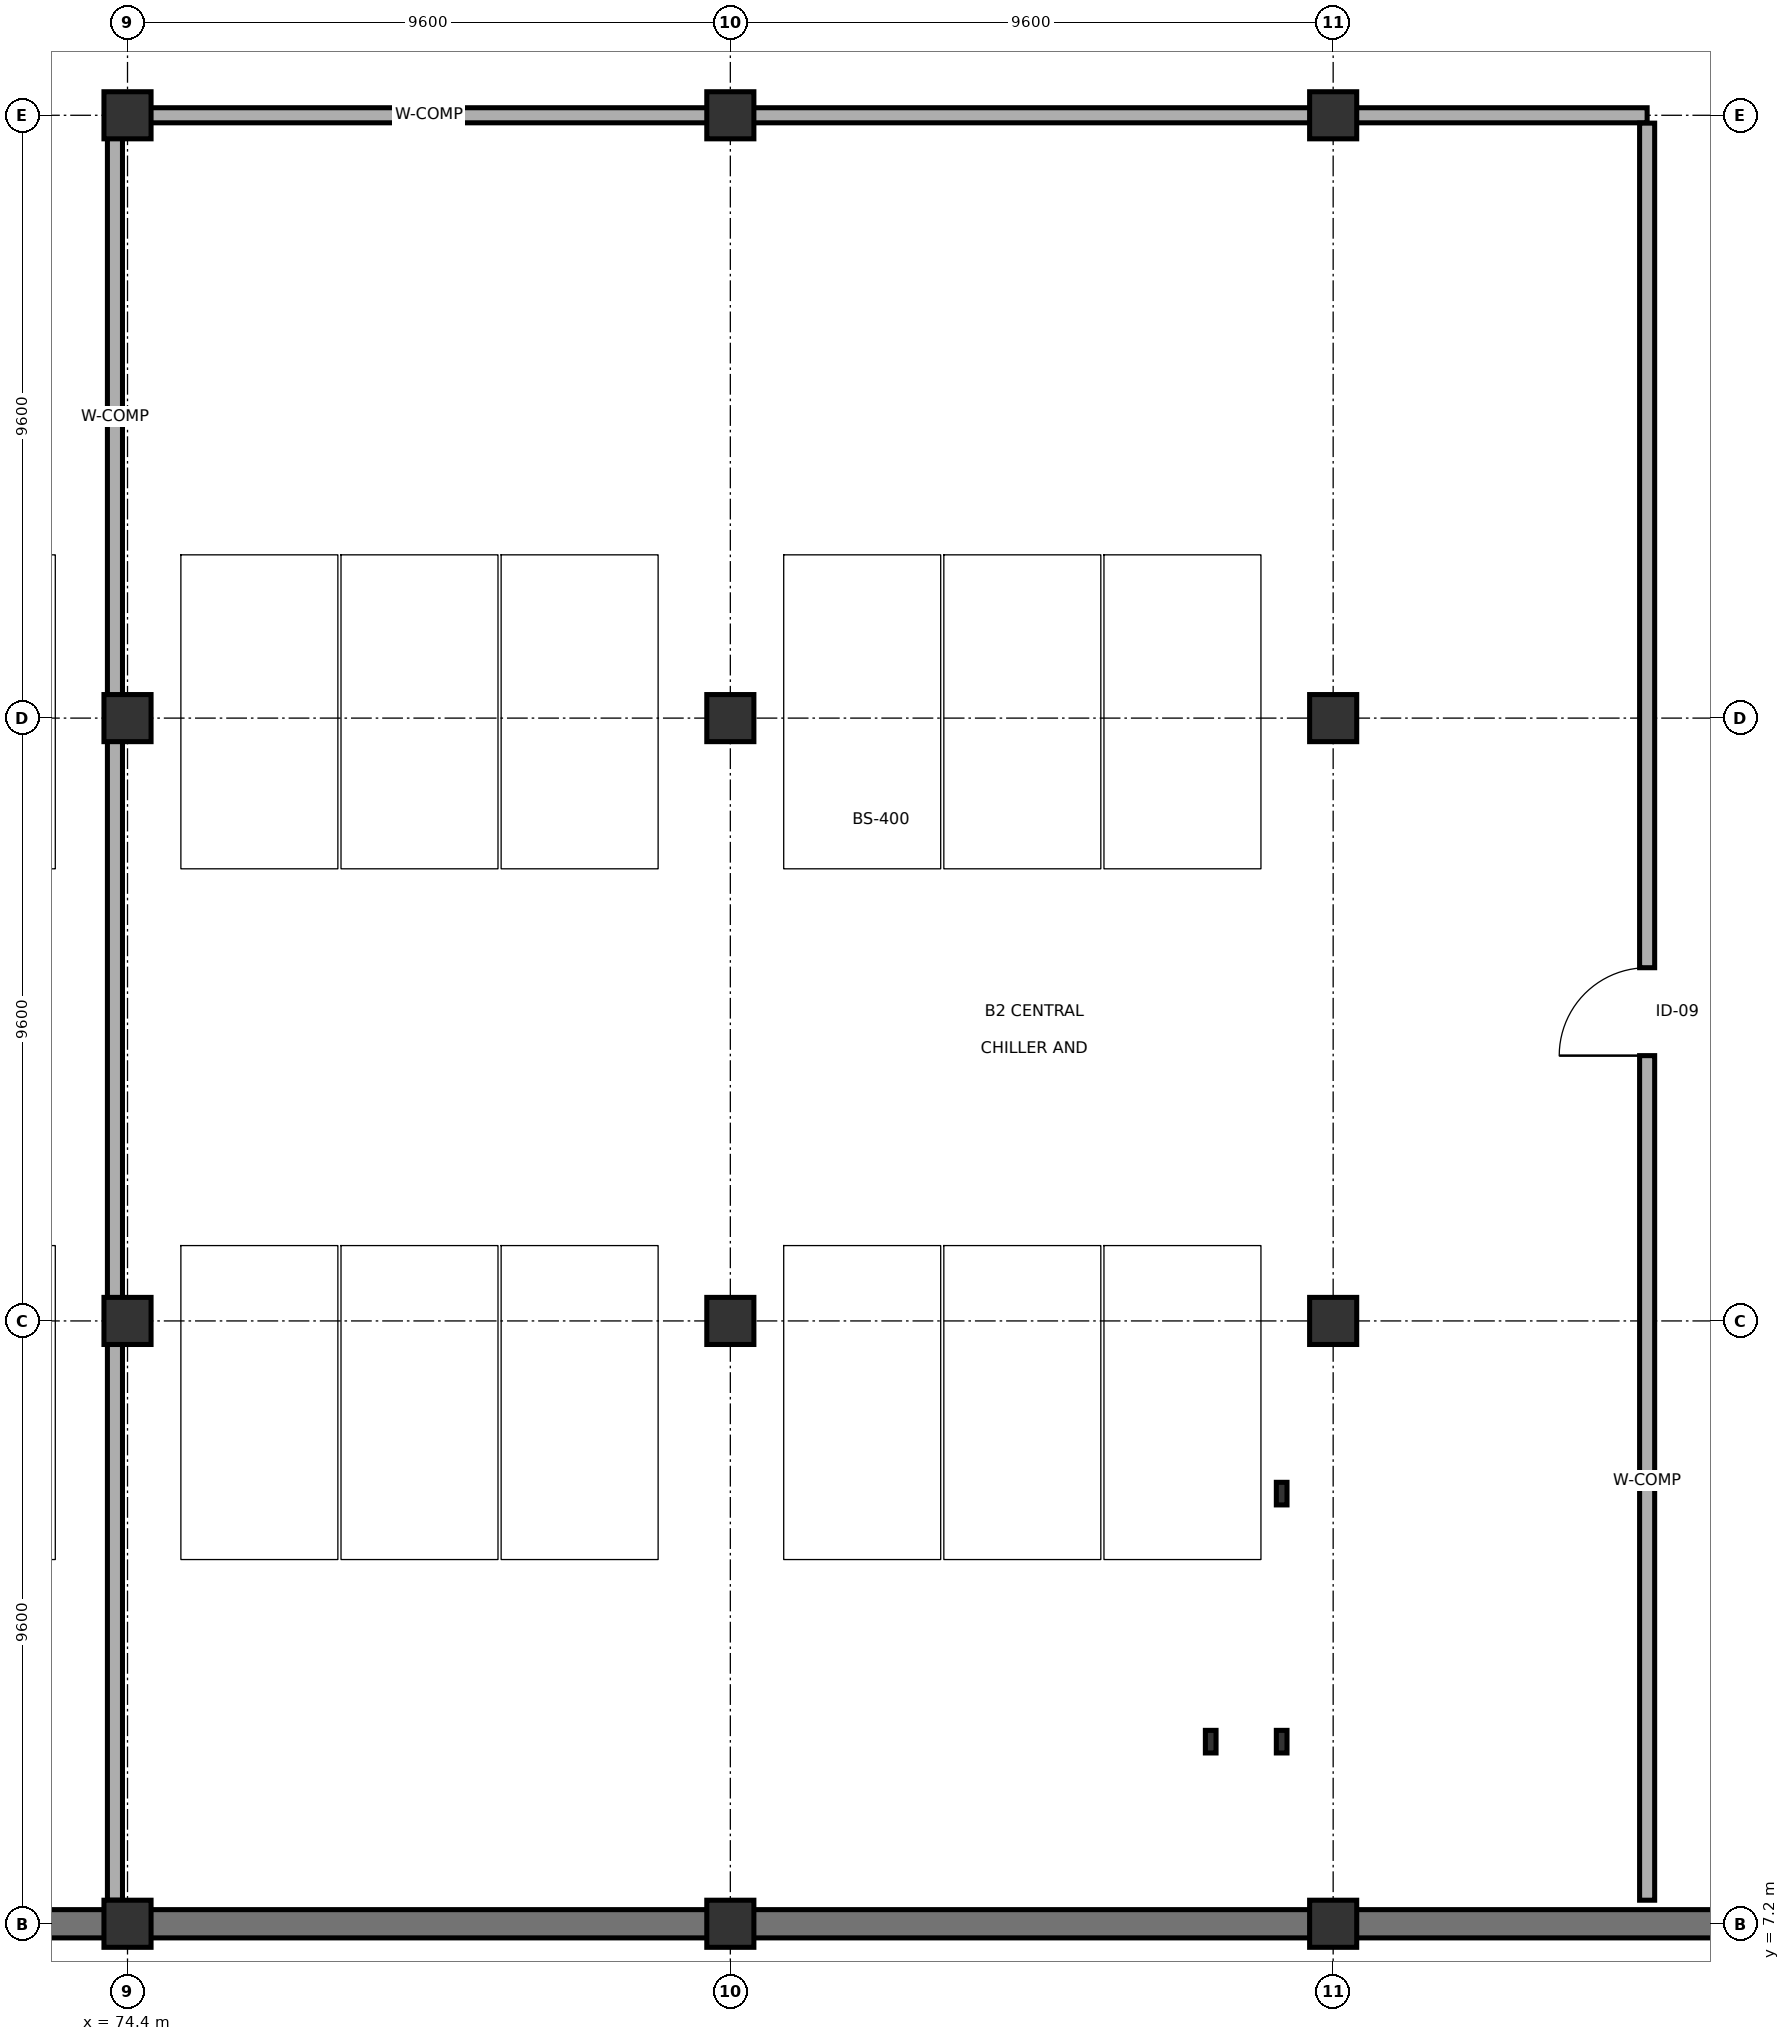
"""IFC4 building model, lengths in metres.
Left out: names, types, materials, properties, quantities, classifications, styles, units other than length and angle.
Written with IfcOpenShell. Run it as: python <this file> out.ifc"""

import sys

from ifc_helpers import new_model, si_unit, direction, frame, frame_2d, origin, origin_2d, place, context, subcontext, project, spatial, rectangle, i_section, extrude, element, fill, save


model = new_model("IFC4")
c1 = context("Model", 3, precision=1e-05, world=origin(), true_north=direction((0.0, 1.0)))
c2 = subcontext(c1, "Body", "Model", "MODEL_VIEW")
j1 = project(units=[si_unit("LENGTHUNIT", "METRE"), si_unit("PLANEANGLEUNIT", "RADIAN")], contexts=[c1])
p1 = place(None, origin())
s1 = spatial("IfcSite", under=j1, at=p1, CompositionType="ELEMENT")
p2 = place(p1, origin())
s2 = spatial("IfcBuilding", under=s1, at=p2, CompositionType="ELEMENT")
p3 = place(p2, frame((0.0, 0.0, -8.4)))
s3 = spatial("IfcBuildingStorey", under=s2, at=p3, CompositionType="ELEMENT", Elevation=-8.4)
for number, where, z_axis, x_axis in (
    (1, (74.4, 7.2, 0.0), (0.0, 0.0, 1.0), (1.0, 0.0, 0.0)),
    (2, (74.4, 16.8, 0.0), (0.0, 0.0, 1.0), (1.0, 0.0, 0.0)),
    (3, (74.4, 26.4, 0.0), (0.0, 0.0, 1.0), (1.0, 0.0, 0.0)),
    (4, (74.4, 36.0, 0.0), (0.0, 0.0, 1.0), (1.0, 0.0, 0.0)),
    (5, (84.0, 7.2, 0.0), (0.0, 0.0, 1.0), (1.0, 0.0, 0.0)),
    (6, (84.0, 16.8, 0.0), (0.0, 0.0, 1.0), (1.0, 0.0, 0.0)),
    (7, (84.0, 26.4, 0.0), (0.0, 0.0, 1.0), (1.0, 0.0, 0.0)),
    (8, (84.0, 36.0, 0.0), (0.0, 0.0, 1.0), (1.0, 0.0, 0.0)),
    (9, (93.6, 7.2, 0.0), (0.0, 0.0, 1.0), (1.0, 0.0, 0.0)),
    (10, (93.6, 16.8, 0.0), (0.0, 0.0, 1.0), (1.0, 0.0, 0.0)),
    (11, (93.6, 26.4, 0.0), (0.0, 0.0, 1.0), (1.0, 0.0, 0.0)),
    (12, (93.6, 36.0, 0.0), (0.0, 0.0, 1.0), (1.0, 0.0, 0.0)),
):
    element("IfcColumn", number, at=place(p3, frame(where, z_axis=z_axis, x_axis=x_axis)), inside=s3, PredefinedType="COLUMN", context=c2, shape_type="SweptSolid", body=[
        extrude(rectangle(XDim=0.75, YDim=0.75, at=origin_2d()), origin(), (0.0, 0.0, 1.0), 4.2),
    ])
for number, where, z_axis, x_axis in (
    (13, (91.65, 10.1, 0.0), (0.0, 0.0, 1.0), (1.0, 0.0, 0.0)),
    (14, (92.78, 10.1, 0.0), (0.0, 0.0, 1.0), (1.0, 0.0, 0.0)),
    (15, (92.78, 14.05, 0.0), (0.0, 0.0, 1.0), (1.0, 0.0, 0.0)),
):
    element("IfcColumn", number, at=place(p3, frame(where, z_axis=z_axis, x_axis=x_axis)), inside=s3, PredefinedType="PILASTER", context=c2, shape_type="SweptSolid", body=[
        extrude(i_section(OverallWidth=0.17, OverallDepth=0.36, WebThickness=0.008, FlangeThickness=0.013, FilletRadius=0.018, at=origin_2d()), origin(), (0.0, 0.0, 1.0), 4.2),
    ])
p4 = place(p3, frame((17.3, 7.2, 0.0), z_axis=(0.0, 0.0, 1.0), x_axis=(1.0, 0.0, 0.0)))
e16 = element("IfcWall", 16, at=p4, inside=s3, PredefinedType="SOLIDWALL", context=c2, shape_type="SweptSolid", body=[
    extrude(rectangle(XDim=138.2, YDim=0.45, at=frame_2d((69.1, 0.0))), origin(), (0.0, 0.0, 1.0), 3.93),
])
p5 = place(p3, frame((74.2, 36.0, 0.0), z_axis=(0.0, 0.0, 1.0), x_axis=(1.0, 0.0, 0.0)))
e17 = element("IfcWall", 17, at=p5, inside=s3, PredefinedType="SOLIDWALL", context=c2, shape_type="SweptSolid", body=[
    extrude(rectangle(XDim=24.4, YDim=0.24, at=frame_2d((12.2, 0.0))), origin(), (0.0, 0.0, 1.0), 3.415),
])
p6 = place(p3, frame((74.2, 7.575, 0.0), z_axis=(0.0, 0.0, 1.0), x_axis=(0.0, 1.0, 0.0)))
e18 = element("IfcWall", 18, at=p6, inside=s3, PredefinedType="SOLIDWALL", context=c2, shape_type="SweptSolid", body=[
    extrude(rectangle(XDim=28.3, YDim=0.24, at=frame_2d((14.15, 0.0))), origin(), (0.0, 0.0, 1.0), 3.415),
])
p7 = place(p3, frame((98.6, 7.575, 0.0), z_axis=(0.0, 0.0, 1.0), x_axis=(0.0, 1.0, 0.0)))
e19 = element("IfcWall", 19, at=p7, inside=s3, PredefinedType="SOLIDWALL", context=c2, shape_type="SweptSolid", body=[
    extrude(rectangle(XDim=28.3, YDim=0.24, at=frame_2d((14.15, 0.0))), origin(), (0.0, 0.0, 1.0), 3.475),
])
p8 = place(p7, frame((13.45, 0.0, 0.0)))
e20 = element("IfcOpeningElement", 20, at=p8, cuts=e19, PredefinedType="OPENING", context=c2, shape_type="SweptSolid", body=[
    extrude(rectangle(XDim=1.4, YDim=2.2, at=frame_2d((0.7, 1.1))), frame((0.0, 0.13, 0.0), z_axis=(0.0, -1.0, 0.0), x_axis=(1.0, 0.0, 0.0)), (0.0, 0.0, 1.0), 0.26),
])
p9 = place(p8, origin())
e21 = element("IfcDoor", 21, at=p9, inside=s3, OperationType="SINGLE_SWING_LEFT", PredefinedType="DOOR", context=c2, shape_type="SweptSolid", body=[
    extrude(rectangle(XDim=1.4, YDim=2.2, at=frame_2d((0.7, 1.1))), frame((0.0, 0.025, 0.0), z_axis=(0.0, -1.0, 0.0), x_axis=(1.0, 0.0, 0.0)), (0.0, 0.0, 1.0), 0.05),
])
fill(e20, e21)
save(model, sys.argv[1])
